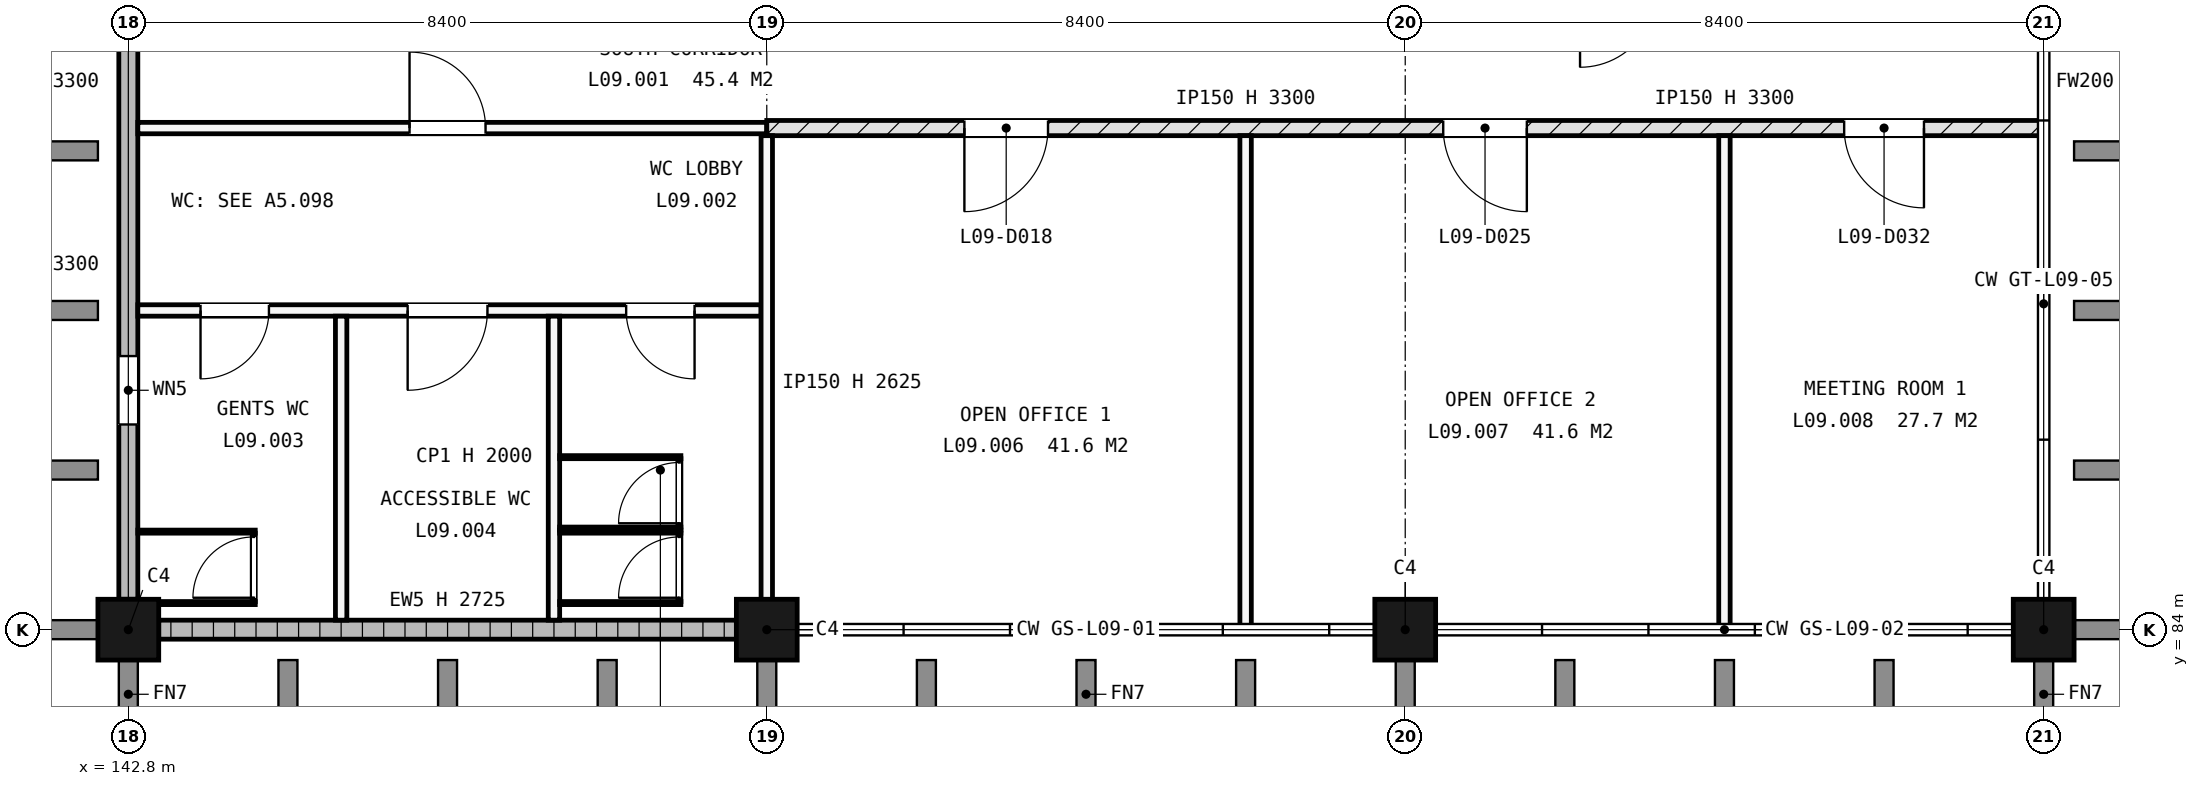
"""IFC4 building model, lengths in metres.
Left out: names, types, materials, properties, quantities, classifications, styles, units other than length and angle.
Written with IfcOpenShell. Run it as: python <this file> out.ifc"""

import sys

from ifc_helpers import new_model, si_unit, direction, frame, frame_2d, origin, origin_2d, place, context, subcontext, project, spatial, rectangle, extrude, element, fill, save


model = new_model("IFC4")
c1 = context("Model", 3, precision=1e-05, world=origin(), true_north=direction((0.0, 1.0)))
c2 = subcontext(c1, "Body", "Model", "MODEL_VIEW")
j1 = project(units=[si_unit("LENGTHUNIT", "METRE"), si_unit("PLANEANGLEUNIT", "RADIAN")], contexts=[c1])
p1 = place(None, origin())
s1 = spatial("IfcSite", under=j1, at=p1, CompositionType="ELEMENT")
p2 = place(p1, origin())
s2 = spatial("IfcBuilding", under=s1, at=p2, CompositionType="ELEMENT")
p3 = place(p2, frame((0.0, 0.0, 36.0)))
s3 = spatial("IfcBuildingStorey", under=s2, at=p3, CompositionType="ELEMENT", Elevation=36.0)
for number, where, z_axis, x_axis in (
    (1, (142.8, 84.0, -0.25), (0.0, 0.0, 1.0), (1.0, 0.0, 0.0)),
    (2, (151.2, 84.0, -0.25), (0.0, 0.0, 1.0), (1.0, 0.0, 0.0)),
    (3, (159.6, 84.0, -0.25), (0.0, 0.0, 1.0), (1.0, 0.0, 0.0)),
    (4, (168.0, 84.0, -0.25), (0.0, 0.0, 1.0), (1.0, 0.0, 0.0)),
):
    element("IfcColumn", number, at=place(p3, frame(where, z_axis=z_axis, x_axis=x_axis)), inside=s3, PredefinedType="COLUMN", context=c2, shape_type="SweptSolid", body=[
        extrude(rectangle(XDim=0.8, YDim=0.8, at=origin_2d()), origin(), (0.0, 0.0, 1.0), 3.625),
    ])
p4 = place(p3, frame((143.2, 84.0, 0.0), z_axis=(0.0, 0.0, 1.0), x_axis=(1.0, 0.0, 0.0)))
e5 = element("IfcWall", 5, at=p4, inside=s3, PredefinedType="STANDARD", context=c2, shape_type="SweptSolid", body=[
    extrude(rectangle(XDim=7.6, YDim=0.25, at=frame_2d((3.8, 0.0))), origin(), (0.0, 0.0, 1.0), 2.725),
])
p5 = place(p3, frame((142.8, 84.4, 0.0), z_axis=(0.0, 0.0, 1.0), x_axis=(0.0, 1.0, 0.0)))
e6 = element("IfcWall", 6, at=p5, inside=s3, PredefinedType="STANDARD", context=c2, shape_type="SweptSolid", body=[
    extrude(rectangle(XDim=7.775, YDim=0.25, at=frame_2d((3.888, 0.0))), origin(), (0.0, 0.0, 1.0), 3.3),
])
p6 = place(p5, frame((2.3, 0.0, 2.1)))
e7 = element("IfcOpeningElement", 7, at=p6, cuts=e6, PredefinedType="OPENING", context=c2, shape_type="SweptSolid", body=[
    extrude(rectangle(XDim=0.9, YDim=0.6, at=frame_2d((0.45, 0.3))), frame((0.0, 0.135, 0.0), z_axis=(0.0, -1.0, 0.0), x_axis=(1.0, 0.0, 0.0)), (0.0, 0.0, 1.0), 0.27),
])
p7 = place(p3, frame((142.925, 88.2, 0.0), z_axis=(0.0, 0.0, 1.0), x_axis=(1.0, 0.0, 0.0)))
e8 = element("IfcWall", 8, at=p7, inside=s3, PredefinedType="PARTITIONING", context=c2, shape_type="SweptSolid", body=[
    extrude(rectangle(XDim=8.2, YDim=0.15, at=frame_2d((4.1, 0.0))), origin(), (0.0, 0.0, 1.0), 3.3),
])
p8 = place(p7, frame((0.825, 0.0, 0.0)))
e9 = element("IfcOpeningElement", 9, at=p8, cuts=e8, PredefinedType="OPENING", context=c2, shape_type="SweptSolid", body=[
    extrude(rectangle(XDim=0.9, YDim=2.1, at=frame_2d((0.45, 1.05))), frame((0.0, 0.085, 0.0), z_axis=(0.0, -1.0, 0.0), x_axis=(1.0, 0.0, 0.0)), (0.0, 0.0, 1.0), 0.17),
])
p9 = place(p7, frame((3.55, 0.0, 0.0)))
e10 = element("IfcOpeningElement", 10, at=p9, cuts=e8, PredefinedType="OPENING", context=c2, shape_type="SweptSolid", body=[
    extrude(rectangle(XDim=1.05, YDim=2.25, at=frame_2d((0.525, 1.125))), frame((0.0, 0.085, 0.0), z_axis=(0.0, -1.0, 0.0), x_axis=(1.0, 0.0, 0.0)), (0.0, 0.0, 1.0), 0.17),
])
p10 = place(p7, frame((6.425, 0.0, 0.0)))
e11 = element("IfcOpeningElement", 11, at=p10, cuts=e8, PredefinedType="OPENING", context=c2, shape_type="SweptSolid", body=[
    extrude(rectangle(XDim=0.9, YDim=2.1, at=frame_2d((0.45, 1.05))), frame((0.0, 0.085, 0.0), z_axis=(0.0, -1.0, 0.0), x_axis=(1.0, 0.0, 0.0)), (0.0, 0.0, 1.0), 0.17),
])
p11 = place(p3, frame((142.925, 90.6, 0.0), z_axis=(0.0, 0.0, 1.0), x_axis=(1.0, 0.0, 0.0)))
e12 = element("IfcWall", 12, at=p11, inside=s3, PredefinedType="PARTITIONING", context=c2, shape_type="SweptSolid", body=[
    extrude(rectangle(XDim=8.275, YDim=0.15, at=frame_2d((4.137, 0.0))), origin(), (0.0, 0.0, 1.0), 3.3),
])
p12 = place(p11, frame((3.575, 0.0, 0.0)))
e13 = element("IfcOpeningElement", 13, at=p12, cuts=e12, PredefinedType="OPENING", context=c2, shape_type="SweptSolid", body=[
    extrude(rectangle(XDim=1.0, YDim=2.1, at=frame_2d((0.5, 1.05))), frame((0.0, 0.085, 0.0), z_axis=(0.0, -1.0, 0.0), x_axis=(1.0, 0.0, 0.0)), (0.0, 0.0, 1.0), 0.17),
])
p13 = place(p3, frame((151.2, 90.6, 0.0), z_axis=(0.0, 0.0, 1.0), x_axis=(1.0, 0.0, 0.0)))
e14 = element("IfcWall", 14, at=p13, inside=s3, PredefinedType="SOLIDWALL", context=c2, shape_type="SweptSolid", body=[
    extrude(rectangle(XDim=16.8, YDim=0.2, at=frame_2d((8.4, 0.0))), origin(), (0.0, 0.0, 1.0), 3.3),
])
p14 = place(p13, frame((2.6, 0.0, 0.0)))
e15 = element("IfcOpeningElement", 15, at=p14, cuts=e14, PredefinedType="OPENING", context=c2, shape_type="SweptSolid", body=[
    extrude(rectangle(XDim=1.1, YDim=2.25, at=frame_2d((0.55, 1.125))), frame((0.0, 0.11, 0.0), z_axis=(0.0, -1.0, 0.0), x_axis=(1.0, 0.0, 0.0)), (0.0, 0.0, 1.0), 0.22),
])
p15 = place(p13, frame((8.9, 0.0, 0.0)))
e16 = element("IfcOpeningElement", 16, at=p15, cuts=e14, PredefinedType="OPENING", context=c2, shape_type="SweptSolid", body=[
    extrude(rectangle(XDim=1.1, YDim=2.25, at=frame_2d((0.55, 1.125))), frame((0.0, 0.11, 0.0), z_axis=(0.0, -1.0, 0.0), x_axis=(1.0, 0.0, 0.0)), (0.0, 0.0, 1.0), 0.22),
])
p16 = place(p13, frame((14.175, 0.0, 0.0)))
e17 = element("IfcOpeningElement", 17, at=p16, cuts=e14, PredefinedType="OPENING", context=c2, shape_type="SweptSolid", body=[
    extrude(rectangle(XDim=1.05, YDim=2.1, at=frame_2d((0.525, 1.05))), frame((0.0, 0.11, 0.0), z_axis=(0.0, -1.0, 0.0), x_axis=(1.0, 0.0, 0.0)), (0.0, 0.0, 1.0), 0.22),
])
for number, where, z_axis, x_axis in (
    (18, (145.6, 84.125, 0.0), (0.0, 0.0, 1.0), (0.0, 1.0, 0.0)),
    (19, (148.4, 84.125, 0.0), (0.0, 0.0, 1.0), (0.0, 1.0, 0.0)),
):
    element("IfcWall", number, at=place(p3, frame(where, z_axis=z_axis, x_axis=x_axis)), inside=s3, PredefinedType="PARTITIONING", context=c2, shape_type="SweptSolid", body=[
        extrude(rectangle(XDim=4.0, YDim=0.15, at=frame_2d((2.0, 0.0))), origin(), (0.0, 0.0, 1.0), 3.3),
    ])
p17 = place(p3, frame((151.2, 84.0, 0.0), z_axis=(0.0, 0.0, 1.0), x_axis=(0.0, 1.0, 0.0)))
e20 = element("IfcWall", 20, at=p17, inside=s3, PredefinedType="PARTITIONING", context=c2, shape_type="SweptSolid", body=[
    extrude(rectangle(XDim=6.5, YDim=0.15, at=frame_2d((3.25, 0.0))), origin(), (0.0, 0.0, 1.0), 2.625),
])
for number, where, z_axis, x_axis in (
    (21, (157.5, 84.0, 0.0), (0.0, 0.0, 1.0), (0.0, 1.0, 0.0)),
    (22, (163.8, 84.0, 0.0), (0.0, 0.0, 1.0), (0.0, 1.0, 0.0)),
):
    element("IfcWall", number, at=place(p3, frame(where, z_axis=z_axis, x_axis=x_axis)), inside=s3, PredefinedType="PARTITIONING", context=c2, shape_type="SweptSolid", body=[
        extrude(rectangle(XDim=6.5, YDim=0.15, at=frame_2d((3.25, 0.0))), origin(), (0.0, 0.0, 1.0), 3.3),
    ])
p18 = place(p3, frame((142.93, 84.35, 0.0), z_axis=(0.0, 0.0, 1.0), x_axis=(1.0, 0.0, 0.0)))
e23 = element("IfcWall", 23, at=p18, inside=s3, PredefinedType="PARTITIONING", context=c2, shape_type="SweptSolid", body=[
    extrude(rectangle(XDim=1.54, YDim=0.04, at=frame_2d((0.77, 0.0))), origin(), (0.0, 0.0, 1.0), 2.0),
])
p19 = place(p3, frame((142.925, 85.29, 0.0), z_axis=(0.0, 0.0, 1.0), x_axis=(1.0, 0.0, 0.0)))
e24 = element("IfcWall", 24, at=p19, inside=s3, PredefinedType="PARTITIONING", context=c2, shape_type="SweptSolid", body=[
    extrude(rectangle(XDim=1.545, YDim=0.04, at=frame_2d((0.772, 0.0))), origin(), (0.0, 0.0, 1.0), 2.0),
])
p20 = place(p3, frame((144.45, 84.37, 0.0), z_axis=(0.0, 0.0, 1.0), x_axis=(0.0, 1.0, 0.0)))
e25 = element("IfcWall", 25, at=p20, inside=s3, PredefinedType="PARTITIONING", context=c2, shape_type="SweptSolid", body=[
    extrude(rectangle(XDim=0.9, YDim=0.04, at=frame_2d((0.45, 0.0))), origin(), (0.0, 0.0, 1.0), 2.0),
])
p21 = place(p20, frame((0.05, 0.0, 0.0)))
e26 = element("IfcOpeningElement", 26, at=p21, cuts=e25, PredefinedType="OPENING", context=c2, shape_type="SweptSolid", body=[
    extrude(rectangle(XDim=0.8, YDim=2.0, at=frame_2d((0.4, 1.0))), frame((0.0, 0.03, 0.0), z_axis=(0.0, -1.0, 0.0), x_axis=(1.0, 0.0, 0.0)), (0.0, 0.0, 1.0), 0.06),
])
for number, where, z_axis, x_axis in (
    (27, (148.475, 84.35, 0.0), (0.0, 0.0, 1.0), (1.0, 0.0, 0.0)),
    (28, (148.475, 85.29, 0.0), (0.0, 0.0, 1.0), (1.0, 0.0, 0.0)),
):
    element("IfcWall", number, at=place(p3, frame(where, z_axis=z_axis, x_axis=x_axis)), inside=s3, PredefinedType="PARTITIONING", context=c2, shape_type="SweptSolid", body=[
        extrude(rectangle(XDim=1.595, YDim=0.04, at=frame_2d((0.797, 0.0))), origin(), (0.0, 0.0, 1.0), 2.0),
    ])
p22 = place(p3, frame((150.05, 84.37, 0.0), z_axis=(0.0, 0.0, 1.0), x_axis=(0.0, 1.0, 0.0)))
e29 = element("IfcWall", 29, at=p22, inside=s3, PredefinedType="PARTITIONING", context=c2, shape_type="SweptSolid", body=[
    extrude(rectangle(XDim=0.9, YDim=0.04, at=frame_2d((0.45, 0.0))), origin(), (0.0, 0.0, 1.0), 2.0),
])
p23 = place(p22, frame((0.05, 0.0, 0.0)))
e30 = element("IfcOpeningElement", 30, at=p23, cuts=e29, PredefinedType="OPENING", context=c2, shape_type="SweptSolid", body=[
    extrude(rectangle(XDim=0.8, YDim=2.0, at=frame_2d((0.4, 1.0))), frame((0.0, 0.03, 0.0), z_axis=(0.0, -1.0, 0.0), x_axis=(1.0, 0.0, 0.0)), (0.0, 0.0, 1.0), 0.06),
])
for number, where, z_axis, x_axis in (
    (31, (148.475, 85.33, 0.0), (0.0, 0.0, 1.0), (1.0, 0.0, 0.0)),
    (32, (148.475, 86.27, 0.0), (0.0, 0.0, 1.0), (1.0, 0.0, 0.0)),
):
    element("IfcWall", number, at=place(p3, frame(where, z_axis=z_axis, x_axis=x_axis)), inside=s3, PredefinedType="PARTITIONING", context=c2, shape_type="SweptSolid", body=[
        extrude(rectangle(XDim=1.595, YDim=0.04, at=frame_2d((0.797, 0.0))), origin(), (0.0, 0.0, 1.0), 2.0),
    ])
p24 = place(p3, frame((150.05, 85.35, 0.0), z_axis=(0.0, 0.0, 1.0), x_axis=(0.0, 1.0, 0.0)))
e33 = element("IfcWall", 33, at=p24, inside=s3, PredefinedType="PARTITIONING", context=c2, shape_type="SweptSolid", body=[
    extrude(rectangle(XDim=0.9, YDim=0.04, at=frame_2d((0.45, 0.0))), origin(), (0.0, 0.0, 1.0), 2.0),
])
p25 = place(p24, frame((0.05, 0.0, 0.0)))
e34 = element("IfcOpeningElement", 34, at=p25, cuts=e33, PredefinedType="OPENING", context=c2, shape_type="SweptSolid", body=[
    extrude(rectangle(XDim=0.8, YDim=2.0, at=frame_2d((0.4, 1.0))), frame((0.0, 0.03, 0.0), z_axis=(0.0, -1.0, 0.0), x_axis=(1.0, 0.0, 0.0)), (0.0, 0.0, 1.0), 0.06),
])
p26 = place(p6, origin())
e35 = element("IfcWindow", 35, at=p26, inside=s3, PartitioningType="SINGLE_PANEL", PredefinedType="WINDOW", context=c2, shape_type="SweptSolid", body=[
    extrude(rectangle(XDim=0.9, YDim=0.6, at=frame_2d((0.45, 0.3))), frame((0.0, 0.03, 0.0), z_axis=(0.0, -1.0, 0.0), x_axis=(1.0, 0.0, 0.0)), (0.0, 0.0, 1.0), 0.06),
])
fill(e7, e35)
p27 = place(p8, origin())
e36 = element("IfcDoor", 36, at=p27, inside=s3, OperationType="SINGLE_SWING_LEFT", PredefinedType="DOOR", context=c2, shape_type="SweptSolid", body=[
    extrude(rectangle(XDim=0.9, YDim=2.1, at=frame_2d((0.45, 1.05))), frame((0.0, 0.025, 0.0), z_axis=(0.0, -1.0, 0.0), x_axis=(1.0, 0.0, 0.0)), (0.0, 0.0, 1.0), 0.05),
])
fill(e9, e36)
p28 = place(p9, origin())
e37 = element("IfcDoor", 37, at=p28, inside=s3, OperationType="SINGLE_SWING_LEFT", PredefinedType="DOOR", context=c2, shape_type="SweptSolid", body=[
    extrude(rectangle(XDim=1.05, YDim=2.25, at=frame_2d((0.525, 1.125))), frame((0.0, 0.025, 0.0), z_axis=(0.0, -1.0, 0.0), x_axis=(1.0, 0.0, 0.0)), (0.0, 0.0, 1.0), 0.05),
])
fill(e10, e37)
p29 = place(p10, origin())
e38 = element("IfcDoor", 38, at=p29, inside=s3, OperationType="SINGLE_SWING_RIGHT", PredefinedType="DOOR", context=c2, shape_type="SweptSolid", body=[
    extrude(rectangle(XDim=0.9, YDim=2.1, at=frame_2d((0.45, 1.05))), frame((0.0, 0.025, 0.0), z_axis=(0.0, -1.0, 0.0), x_axis=(1.0, 0.0, 0.0)), (0.0, 0.0, 1.0), 0.05),
])
fill(e11, e38)
p30 = place(p14, origin())
e39 = element("IfcDoor", 39, at=p30, inside=s3, OperationType="SINGLE_SWING_LEFT", PredefinedType="DOOR", context=c2, shape_type="SweptSolid", body=[
    extrude(rectangle(XDim=1.1, YDim=2.25, at=frame_2d((0.55, 1.125))), frame((0.0, 0.025, 0.0), z_axis=(0.0, -1.0, 0.0), x_axis=(1.0, 0.0, 0.0)), (0.0, 0.0, 1.0), 0.05),
])
fill(e15, e39)
p31 = place(p15, origin())
e40 = element("IfcDoor", 40, at=p31, inside=s3, OperationType="SINGLE_SWING_RIGHT", PredefinedType="DOOR", context=c2, shape_type="SweptSolid", body=[
    extrude(rectangle(XDim=1.1, YDim=2.25, at=frame_2d((0.55, 1.125))), frame((0.0, 0.025, 0.0), z_axis=(0.0, -1.0, 0.0), x_axis=(1.0, 0.0, 0.0)), (0.0, 0.0, 1.0), 0.05),
])
fill(e16, e40)
p32 = place(p16, origin())
e41 = element("IfcDoor", 41, at=p32, inside=s3, OperationType="SINGLE_SWING_RIGHT", PredefinedType="DOOR", context=c2, shape_type="SweptSolid", body=[
    extrude(rectangle(XDim=1.05, YDim=2.1, at=frame_2d((0.525, 1.05))), frame((0.0, 0.025, 0.0), z_axis=(0.0, -1.0, 0.0), x_axis=(1.0, 0.0, 0.0)), (0.0, 0.0, 1.0), 0.05),
])
fill(e17, e41)
p33 = place(p12, origin())
e42 = element("IfcDoor", 42, at=p33, inside=s3, OperationType="SINGLE_SWING_RIGHT", PredefinedType="DOOR", context=c2, shape_type="SweptSolid", body=[
    extrude(rectangle(XDim=1.0, YDim=2.1, at=frame_2d((0.5, 1.05))), frame((0.0, 0.025, 0.0), z_axis=(0.0, -1.0, 0.0), x_axis=(1.0, 0.0, 0.0)), (0.0, 0.0, 1.0), 0.05),
])
fill(e13, e42)
p34 = place(p21, origin())
e43 = element("IfcDoor", 43, at=p34, inside=s3, OperationType="SINGLE_SWING_LEFT", PredefinedType="DOOR", context=c2, shape_type="SweptSolid", body=[
    extrude(rectangle(XDim=0.8, YDim=2.0, at=frame_2d((0.4, 1.0))), frame((0.0, 0.02, 0.0), z_axis=(0.0, -1.0, 0.0), x_axis=(1.0, 0.0, 0.0)), (0.0, 0.0, 1.0), 0.04),
])
fill(e26, e43)
p35 = place(p23, origin())
e44 = element("IfcDoor", 44, at=p35, inside=s3, OperationType="SINGLE_SWING_LEFT", PredefinedType="DOOR", context=c2, shape_type="SweptSolid", body=[
    extrude(rectangle(XDim=0.8, YDim=2.0, at=frame_2d((0.4, 1.0))), frame((0.0, 0.02, 0.0), z_axis=(0.0, -1.0, 0.0), x_axis=(1.0, 0.0, 0.0)), (0.0, 0.0, 1.0), 0.04),
])
fill(e30, e44)
p36 = place(p25, origin())
e45 = element("IfcDoor", 45, at=p36, inside=s3, OperationType="SINGLE_SWING_LEFT", PredefinedType="DOOR", context=c2, shape_type="SweptSolid", body=[
    extrude(rectangle(XDim=0.8, YDim=2.0, at=frame_2d((0.4, 1.0))), frame((0.0, 0.02, 0.0), z_axis=(0.0, -1.0, 0.0), x_axis=(1.0, 0.0, 0.0)), (0.0, 0.0, 1.0), 0.04),
])
fill(e34, e45)
save(model, sys.argv[1])
